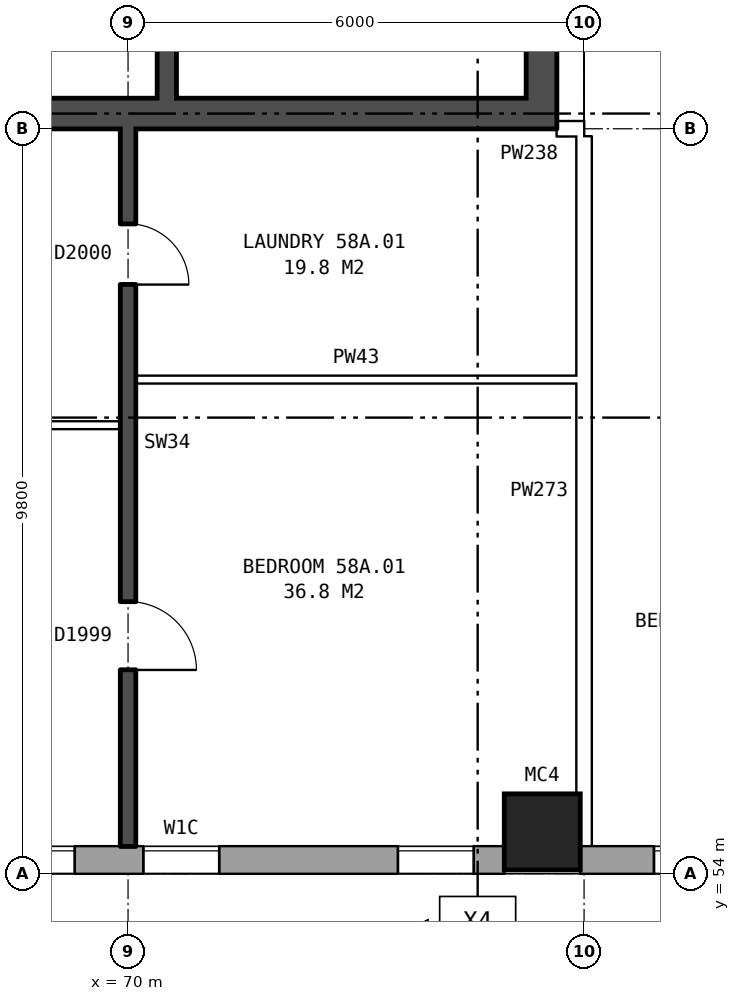
"""IFC4 building model, lengths in metres.
Left out: names, types, materials, properties, quantities, classifications, styles, units other than length and angle.
Written with IfcOpenShell. Run it as: python <this file> out.ifc"""

import sys

from ifc_helpers import new_model, si_unit, direction, frame, frame_2d, origin, origin_2d, place, context, subcontext, project, spatial, rectangle, hollow_rectangle, extrude, element, fill, save


model = new_model("IFC4")
c1 = context("Model", 3, precision=1e-05, world=origin(), true_north=direction((0.0, 1.0)))
c2 = subcontext(c1, "Body", "Model", "MODEL_VIEW")
j1 = project(units=[si_unit("LENGTHUNIT", "METRE"), si_unit("PLANEANGLEUNIT", "RADIAN")], contexts=[c1])
p1 = place(None, origin())
s1 = spatial("IfcSite", under=j1, at=p1, CompositionType="ELEMENT")
p2 = place(p1, origin())
s2 = spatial("IfcBuilding", under=s1, at=p2, CompositionType="ELEMENT")
p3 = place(p2, frame((0.0, 0.0, 205.9)))
s3 = spatial("IfcBuildingStorey", under=s2, at=p3, CompositionType="ELEMENT", Elevation=205.9)
p4 = place(p3, frame((75.45, 54.55, 0.0), z_axis=(0.0, 0.0, 1.0), x_axis=(1.0, 0.0, 0.0)))
e1 = element("IfcColumn", 1, at=p4, inside=s3, PredefinedType="COLUMN", context=c2, shape_type="SweptSolid", body=[
    extrude(hollow_rectangle(XDim=1.0, YDim=1.0, WallThickness=0.055, at=origin_2d()), origin(), (0.0, 0.0, 1.0), 3.1),
])
p5 = place(p3, frame((35.075, 54.18, 0.0), z_axis=(0.0, 0.0, 1.0), x_axis=(1.0, 0.0, 0.0)))
e2 = element("IfcWall", 2, at=p5, inside=s3, PredefinedType="STANDARD", context=c2, shape_type="SweptSolid", body=[
    extrude(rectangle(XDim=39.875, YDim=0.36, at=frame_2d((19.938, 0.0))), origin(), (0.0, 0.0, 1.0), 2.85),
])
p6 = place(p5, frame((2.625, 0.0, 0.8)))
e3 = element("IfcOpeningElement", 3, at=p6, cuts=e2, PredefinedType="OPENING", context=c2, shape_type="SweptSolid", body=[
    extrude(rectangle(XDim=1.6, YDim=1.8, at=frame_2d((0.8, 0.9))), frame((0.0, 0.19, 0.0), z_axis=(0.0, -1.0, 0.0), x_axis=(1.0, 0.0, 0.0)), (0.0, 0.0, 1.0), 0.38),
])
p7 = place(p5, frame((5.625, 0.0, 0.8)))
e4 = element("IfcOpeningElement", 4, at=p7, cuts=e2, PredefinedType="OPENING", context=c2, shape_type="SweptSolid", body=[
    extrude(rectangle(XDim=1.6, YDim=1.8, at=frame_2d((0.8, 0.9))), frame((0.0, 0.19, 0.0), z_axis=(0.0, -1.0, 0.0), x_axis=(1.0, 0.0, 0.0)), (0.0, 0.0, 1.0), 0.38),
])
p8 = place(p5, frame((8.625, 0.0, 0.8)))
e5 = element("IfcOpeningElement", 5, at=p8, cuts=e2, PredefinedType="OPENING", context=c2, shape_type="SweptSolid", body=[
    extrude(rectangle(XDim=1.6, YDim=1.8, at=frame_2d((0.8, 0.9))), frame((0.0, 0.19, 0.0), z_axis=(0.0, -1.0, 0.0), x_axis=(1.0, 0.0, 0.0)), (0.0, 0.0, 1.0), 0.38),
])
p9 = place(p5, frame((11.625, 0.0, 0.8)))
e6 = element("IfcOpeningElement", 6, at=p9, cuts=e2, PredefinedType="OPENING", context=c2, shape_type="SweptSolid", body=[
    extrude(rectangle(XDim=1.6, YDim=1.8, at=frame_2d((0.8, 0.9))), frame((0.0, 0.19, 0.0), z_axis=(0.0, -1.0, 0.0), x_axis=(1.0, 0.0, 0.0)), (0.0, 0.0, 1.0), 0.38),
])
p10 = place(p5, frame((14.625, 0.0, 0.8)))
e7 = element("IfcOpeningElement", 7, at=p10, cuts=e2, PredefinedType="OPENING", context=c2, shape_type="SweptSolid", body=[
    extrude(rectangle(XDim=1.6, YDim=1.8, at=frame_2d((0.8, 0.9))), frame((0.0, 0.19, 0.0), z_axis=(0.0, -1.0, 0.0), x_axis=(1.0, 0.0, 0.0)), (0.0, 0.0, 1.0), 0.38),
])
p11 = place(p5, frame((17.625, 0.0, 0.8)))
e8 = element("IfcOpeningElement", 8, at=p11, cuts=e2, PredefinedType="OPENING", context=c2, shape_type="SweptSolid", body=[
    extrude(rectangle(XDim=1.6, YDim=1.8, at=frame_2d((0.8, 0.9))), frame((0.0, 0.19, 0.0), z_axis=(0.0, -1.0, 0.0), x_axis=(1.0, 0.0, 0.0)), (0.0, 0.0, 1.0), 0.38),
])
p12 = place(p5, frame((20.625, 0.0, 0.8)))
e9 = element("IfcOpeningElement", 9, at=p12, cuts=e2, PredefinedType="OPENING", context=c2, shape_type="SweptSolid", body=[
    extrude(rectangle(XDim=1.6, YDim=1.8, at=frame_2d((0.8, 0.9))), frame((0.0, 0.19, 0.0), z_axis=(0.0, -1.0, 0.0), x_axis=(1.0, 0.0, 0.0)), (0.0, 0.0, 1.0), 0.38),
])
p13 = place(p5, frame((23.625, 0.0, 0.8)))
e10 = element("IfcOpeningElement", 10, at=p13, cuts=e2, PredefinedType="OPENING", context=c2, shape_type="SweptSolid", body=[
    extrude(rectangle(XDim=1.6, YDim=1.8, at=frame_2d((0.8, 0.9))), frame((0.0, 0.19, 0.0), z_axis=(0.0, -1.0, 0.0), x_axis=(1.0, 0.0, 0.0)), (0.0, 0.0, 1.0), 0.38),
])
p14 = place(p5, frame((26.625, 0.0, 0.8)))
e11 = element("IfcOpeningElement", 11, at=p14, cuts=e2, PredefinedType="OPENING", context=c2, shape_type="SweptSolid", body=[
    extrude(rectangle(XDim=1.6, YDim=1.8, at=frame_2d((0.8, 0.9))), frame((0.0, 0.19, 0.0), z_axis=(0.0, -1.0, 0.0), x_axis=(1.0, 0.0, 0.0)), (0.0, 0.0, 1.0), 0.38),
])
p15 = place(p5, frame((29.625, 0.0, 0.8)))
e12 = element("IfcOpeningElement", 12, at=p15, cuts=e2, PredefinedType="OPENING", context=c2, shape_type="SweptSolid", body=[
    extrude(rectangle(XDim=1.6, YDim=1.8, at=frame_2d((0.8, 0.9))), frame((0.0, 0.19, 0.0), z_axis=(0.0, -1.0, 0.0), x_axis=(1.0, 0.0, 0.0)), (0.0, 0.0, 1.0), 0.38),
])
p16 = place(p5, frame((32.625, 0.0, 0.8)))
e13 = element("IfcOpeningElement", 13, at=p16, cuts=e2, PredefinedType="OPENING", context=c2, shape_type="SweptSolid", body=[
    extrude(rectangle(XDim=1.6, YDim=1.8, at=frame_2d((0.8, 0.9))), frame((0.0, 0.19, 0.0), z_axis=(0.0, -1.0, 0.0), x_axis=(1.0, 0.0, 0.0)), (0.0, 0.0, 1.0), 0.38),
])
p17 = place(p5, frame((35.125, 0.0, 0.8)))
e14 = element("IfcOpeningElement", 14, at=p17, cuts=e2, PredefinedType="OPENING", context=c2, shape_type="SweptSolid", body=[
    extrude(rectangle(XDim=1.0, YDim=1.8, at=frame_2d((0.5, 0.9))), frame((0.0, 0.19, 0.0), z_axis=(0.0, -1.0, 0.0), x_axis=(1.0, 0.0, 0.0)), (0.0, 0.0, 1.0), 0.38),
])
p18 = place(p5, frame((38.475, 0.0, 0.8)))
e15 = element("IfcOpeningElement", 15, at=p18, cuts=e2, PredefinedType="OPENING", context=c2, shape_type="SweptSolid", body=[
    extrude(rectangle(XDim=1.0, YDim=1.8, at=frame_2d((0.5, 0.9))), frame((0.0, 0.19, 0.0), z_axis=(0.0, -1.0, 0.0), x_axis=(1.0, 0.0, 0.0)), (0.0, 0.0, 1.0), 0.38),
])
p19 = place(p3, frame((75.95, 54.18, 0.0), z_axis=(0.0, 0.0, 1.0), x_axis=(1.0, 0.0, 0.0)))
e16 = element("IfcWall", 16, at=p19, inside=s3, PredefinedType="STANDARD", context=c2, shape_type="SweptSolid", body=[
    extrude(rectangle(XDim=55.1, YDim=0.36, at=frame_2d((27.55, 0.0))), origin(), (0.0, 0.0, 1.0), 2.85),
])
p20 = place(p19, frame((0.969, 0.0, 0.8)))
e17 = element("IfcOpeningElement", 17, at=p20, cuts=e16, PredefinedType="OPENING", context=c2, shape_type="SweptSolid", body=[
    extrude(rectangle(XDim=1.6, YDim=1.8, at=frame_2d((0.8, 0.9))), frame((0.0, 0.19, 0.0), z_axis=(0.0, -1.0, 0.0), x_axis=(1.0, 0.0, 0.0)), (0.0, 0.0, 1.0), 0.38),
])
p21 = place(p19, frame((4.406, 0.0, 0.8)))
e18 = element("IfcOpeningElement", 18, at=p21, cuts=e16, PredefinedType="OPENING", context=c2, shape_type="SweptSolid", body=[
    extrude(rectangle(XDim=1.6, YDim=1.8, at=frame_2d((0.8, 0.9))), frame((0.0, 0.19, 0.0), z_axis=(0.0, -1.0, 0.0), x_axis=(1.0, 0.0, 0.0)), (0.0, 0.0, 1.0), 0.38),
])
p22 = place(p19, frame((7.844, 0.0, 0.8)))
e19 = element("IfcOpeningElement", 19, at=p22, cuts=e16, PredefinedType="OPENING", context=c2, shape_type="SweptSolid", body=[
    extrude(rectangle(XDim=1.6, YDim=1.8, at=frame_2d((0.8, 0.9))), frame((0.0, 0.19, 0.0), z_axis=(0.0, -1.0, 0.0), x_axis=(1.0, 0.0, 0.0)), (0.0, 0.0, 1.0), 0.38),
])
p23 = place(p19, frame((11.281, 0.0, 0.8)))
e20 = element("IfcOpeningElement", 20, at=p23, cuts=e16, PredefinedType="OPENING", context=c2, shape_type="SweptSolid", body=[
    extrude(rectangle(XDim=1.6, YDim=1.8, at=frame_2d((0.8, 0.9))), frame((0.0, 0.19, 0.0), z_axis=(0.0, -1.0, 0.0), x_axis=(1.0, 0.0, 0.0)), (0.0, 0.0, 1.0), 0.38),
])
p24 = place(p19, frame((14.719, 0.0, 0.8)))
e21 = element("IfcOpeningElement", 21, at=p24, cuts=e16, PredefinedType="OPENING", context=c2, shape_type="SweptSolid", body=[
    extrude(rectangle(XDim=1.6, YDim=1.8, at=frame_2d((0.8, 0.9))), frame((0.0, 0.19, 0.0), z_axis=(0.0, -1.0, 0.0), x_axis=(1.0, 0.0, 0.0)), (0.0, 0.0, 1.0), 0.38),
])
p25 = place(p19, frame((18.156, 0.0, 0.8)))
e22 = element("IfcOpeningElement", 22, at=p25, cuts=e16, PredefinedType="OPENING", context=c2, shape_type="SweptSolid", body=[
    extrude(rectangle(XDim=1.6, YDim=1.8, at=frame_2d((0.8, 0.9))), frame((0.0, 0.19, 0.0), z_axis=(0.0, -1.0, 0.0), x_axis=(1.0, 0.0, 0.0)), (0.0, 0.0, 1.0), 0.38),
])
p26 = place(p19, frame((21.594, 0.0, 0.8)))
e23 = element("IfcOpeningElement", 23, at=p26, cuts=e16, PredefinedType="OPENING", context=c2, shape_type="SweptSolid", body=[
    extrude(rectangle(XDim=1.6, YDim=1.8, at=frame_2d((0.8, 0.9))), frame((0.0, 0.19, 0.0), z_axis=(0.0, -1.0, 0.0), x_axis=(1.0, 0.0, 0.0)), (0.0, 0.0, 1.0), 0.38),
])
p27 = place(p19, frame((25.031, 0.0, 0.8)))
e24 = element("IfcOpeningElement", 24, at=p27, cuts=e16, PredefinedType="OPENING", context=c2, shape_type="SweptSolid", body=[
    extrude(rectangle(XDim=1.6, YDim=1.8, at=frame_2d((0.8, 0.9))), frame((0.0, 0.19, 0.0), z_axis=(0.0, -1.0, 0.0), x_axis=(1.0, 0.0, 0.0)), (0.0, 0.0, 1.0), 0.38),
])
p28 = place(p19, frame((28.469, 0.0, 0.8)))
e25 = element("IfcOpeningElement", 25, at=p28, cuts=e16, PredefinedType="OPENING", context=c2, shape_type="SweptSolid", body=[
    extrude(rectangle(XDim=1.6, YDim=1.8, at=frame_2d((0.8, 0.9))), frame((0.0, 0.19, 0.0), z_axis=(0.0, -1.0, 0.0), x_axis=(1.0, 0.0, 0.0)), (0.0, 0.0, 1.0), 0.38),
])
p29 = place(p19, frame((31.906, 0.0, 0.8)))
e26 = element("IfcOpeningElement", 26, at=p29, cuts=e16, PredefinedType="OPENING", context=c2, shape_type="SweptSolid", body=[
    extrude(rectangle(XDim=1.6, YDim=1.8, at=frame_2d((0.8, 0.9))), frame((0.0, 0.19, 0.0), z_axis=(0.0, -1.0, 0.0), x_axis=(1.0, 0.0, 0.0)), (0.0, 0.0, 1.0), 0.38),
])
p30 = place(p19, frame((35.344, 0.0, 0.8)))
e27 = element("IfcOpeningElement", 27, at=p30, cuts=e16, PredefinedType="OPENING", context=c2, shape_type="SweptSolid", body=[
    extrude(rectangle(XDim=1.6, YDim=1.8, at=frame_2d((0.8, 0.9))), frame((0.0, 0.19, 0.0), z_axis=(0.0, -1.0, 0.0), x_axis=(1.0, 0.0, 0.0)), (0.0, 0.0, 1.0), 0.38),
])
p31 = place(p19, frame((38.781, 0.0, 0.8)))
e28 = element("IfcOpeningElement", 28, at=p31, cuts=e16, PredefinedType="OPENING", context=c2, shape_type="SweptSolid", body=[
    extrude(rectangle(XDim=1.6, YDim=1.8, at=frame_2d((0.8, 0.9))), frame((0.0, 0.19, 0.0), z_axis=(0.0, -1.0, 0.0), x_axis=(1.0, 0.0, 0.0)), (0.0, 0.0, 1.0), 0.38),
])
p32 = place(p19, frame((42.219, 0.0, 0.8)))
e29 = element("IfcOpeningElement", 29, at=p32, cuts=e16, PredefinedType="OPENING", context=c2, shape_type="SweptSolid", body=[
    extrude(rectangle(XDim=1.6, YDim=1.8, at=frame_2d((0.8, 0.9))), frame((0.0, 0.19, 0.0), z_axis=(0.0, -1.0, 0.0), x_axis=(1.0, 0.0, 0.0)), (0.0, 0.0, 1.0), 0.38),
])
p33 = place(p19, frame((45.656, 0.0, 0.8)))
e30 = element("IfcOpeningElement", 30, at=p33, cuts=e16, PredefinedType="OPENING", context=c2, shape_type="SweptSolid", body=[
    extrude(rectangle(XDim=1.6, YDim=1.8, at=frame_2d((0.8, 0.9))), frame((0.0, 0.19, 0.0), z_axis=(0.0, -1.0, 0.0), x_axis=(1.0, 0.0, 0.0)), (0.0, 0.0, 1.0), 0.38),
])
p34 = place(p19, frame((49.094, 0.0, 0.8)))
e31 = element("IfcOpeningElement", 31, at=p34, cuts=e16, PredefinedType="OPENING", context=c2, shape_type="SweptSolid", body=[
    extrude(rectangle(XDim=1.6, YDim=1.8, at=frame_2d((0.8, 0.9))), frame((0.0, 0.19, 0.0), z_axis=(0.0, -1.0, 0.0), x_axis=(1.0, 0.0, 0.0)), (0.0, 0.0, 1.0), 0.38),
])
p35 = place(p19, frame((52.531, 0.0, 0.8)))
e32 = element("IfcOpeningElement", 32, at=p35, cuts=e16, PredefinedType="OPENING", context=c2, shape_type="SweptSolid", body=[
    extrude(rectangle(XDim=1.6, YDim=1.8, at=frame_2d((0.8, 0.9))), frame((0.0, 0.19, 0.0), z_axis=(0.0, -1.0, 0.0), x_axis=(1.0, 0.0, 0.0)), (0.0, 0.0, 1.0), 0.38),
])
p36 = place(p3, frame((75.44, 63.8, 0.0), z_axis=(0.0, 0.0, 1.0), x_axis=(0.0, 1.0, 0.0)))
e33 = element("IfcWall", 33, at=p36, inside=s3, PredefinedType="SHEAR", context=c2, shape_type="SweptSolid", body=[
    extrude(rectangle(XDim=12.4, YDim=0.4, at=frame_2d((6.2, 0.0))), origin(), (0.0, 0.0, 1.0), 2.85),
])
p37 = place(p36, frame((9.8, 0.0, 0.0)))
e34 = element("IfcOpeningElement", 34, at=p37, cuts=e33, PredefinedType="OPENING", context=c2, shape_type="SweptSolid", body=[
    extrude(rectangle(XDim=1.1, YDim=2.1, at=frame_2d((0.55, 1.05))), frame((0.0, 0.21, 0.0), z_axis=(0.0, -1.0, 0.0), x_axis=(1.0, 0.0, 0.0)), (0.0, 0.0, 1.0), 0.42),
])
p38 = place(p3, frame((67.04, 64.0, 0.0), z_axis=(0.0, 0.0, 1.0), x_axis=(1.0, 0.0, 0.0)))
e35 = element("IfcWall", 35, at=p38, inside=s3, PredefinedType="SHEAR", context=c2, shape_type="SweptSolid", body=[
    extrude(rectangle(XDim=8.2, YDim=0.4, at=frame_2d((4.1, 0.0))), origin(), (0.0, 0.0, 1.0), 2.85),
])
p39 = place(p3, frame((70.51, 64.2, 0.0), z_axis=(0.0, 0.0, 1.0), x_axis=(0.0, 1.0, 0.0)))
e36 = element("IfcWall", 36, at=p39, inside=s3, PredefinedType="SHEAR", context=c2, shape_type="SweptSolid", body=[
    extrude(rectangle(XDim=2.525, YDim=0.25, at=frame_2d((1.263, 0.0))), origin(), (0.0, 0.0, 1.0), 2.85),
])
p40 = place(p3, frame((64.1, 59.9, 0.0), z_axis=(0.0, 0.0, 1.0), x_axis=(1.0, 0.0, 0.0)))
e37 = element("IfcWall", 37, at=p40, inside=s3, PredefinedType="PARTITIONING", context=c2, shape_type="SweptSolid", body=[
    extrude(rectangle(XDim=5.8, YDim=0.1, at=frame_2d((2.9, 0.0))), origin(), (0.0, 0.0, 1.0), 2.85),
])
p41 = place(p40, frame((3.6, 0.0, 0.0)))
e38 = element("IfcOpeningElement", 38, at=p41, cuts=e37, PredefinedType="OPENING", context=c2, shape_type="SweptSolid", body=[
    extrude(rectangle(XDim=0.9, YDim=2.1, at=frame_2d((0.45, 1.05))), frame((0.0, 0.06, 0.0), z_axis=(0.0, -1.0, 0.0), x_axis=(1.0, 0.0, 0.0)), (0.0, 0.0, 1.0), 0.12),
])
p42 = place(p40, frame((0.7, 0.0, 0.0)))
e39 = element("IfcOpeningElement", 39, at=p42, cuts=e37, PredefinedType="OPENING", context=c2, shape_type="SweptSolid", body=[
    extrude(rectangle(XDim=0.9, YDim=2.1, at=frame_2d((0.45, 1.05))), frame((0.0, 0.06, 0.0), z_axis=(0.0, -1.0, 0.0), x_axis=(1.0, 0.0, 0.0)), (0.0, 0.0, 1.0), 0.12),
])
p43 = place(p3, frame((70.1, 60.5, 0.0), z_axis=(0.0, 0.0, 1.0), x_axis=(1.0, 0.0, 0.0)))
e40 = element("IfcWall", 40, at=p43, inside=s3, PredefinedType="PARTITIONING", context=c2, shape_type="SweptSolid", body=[
    extrude(rectangle(XDim=5.8, YDim=0.1, at=frame_2d((2.9, 0.0))), origin(), (0.0, 0.0, 1.0), 2.85),
])
p44 = place(p3, frame((75.64, 63.8, 0.0), z_axis=(0.0, 0.0, 1.0), x_axis=(1.0, 0.0, 0.0)))
e41 = element("IfcWall", 41, at=p44, inside=s3, PredefinedType="PARTITIONING", context=c2, shape_type="SweptSolid", body=[
    extrude(rectangle(XDim=0.36, YDim=0.2, at=frame_2d((0.18, 0.0))), origin(), (0.0, 0.0, 1.0), 2.85),
])
p45 = place(p3, frame((70.0, 54.36, 0.0), z_axis=(0.0, 0.0, 1.0), x_axis=(0.0, 1.0, 0.0)))
e42 = element("IfcWall", 42, at=p45, inside=s3, PredefinedType="SOLIDWALL", context=c2, shape_type="SweptSolid", body=[
    extrude(rectangle(XDim=9.44, YDim=0.2, at=frame_2d((4.72, 0.0))), origin(), (0.0, 0.0, 1.0), 2.85),
])
p46 = place(p45, frame((2.32, 0.0, 0.0)))
e43 = element("IfcOpeningElement", 43, at=p46, cuts=e42, PredefinedType="OPENING", context=c2, shape_type="SweptSolid", body=[
    extrude(rectangle(XDim=0.9, YDim=2.1, at=frame_2d((0.45, 1.05))), frame((0.0, 0.11, 0.0), z_axis=(0.0, -1.0, 0.0), x_axis=(1.0, 0.0, 0.0)), (0.0, 0.0, 1.0), 0.22),
])
p47 = place(p45, frame((7.39, 0.0, 0.0)))
e44 = element("IfcOpeningElement", 44, at=p47, cuts=e42, PredefinedType="OPENING", context=c2, shape_type="SweptSolid", body=[
    extrude(rectangle(XDim=0.8, YDim=2.1, at=frame_2d((0.4, 1.05))), frame((0.0, 0.11, 0.0), z_axis=(0.0, -1.0, 0.0), x_axis=(1.0, 0.0, 0.0)), (0.0, 0.0, 1.0), 0.22),
])
p48 = place(p3, frame((76.0, 54.36, 0.0), z_axis=(0.0, 0.0, 1.0), x_axis=(0.0, 1.0, 0.0)))
e45 = element("IfcWall", 45, at=p48, inside=s3, PredefinedType="PARTITIONING", context=c2, shape_type="SweptSolid", body=[
    extrude(rectangle(XDim=9.34, YDim=0.2, at=frame_2d((4.67, 0.0))), origin(), (0.0, 0.0, 1.0), 2.85),
])
p49 = place(p16, origin())
e46 = element("IfcWindow", 46, at=p49, inside=s3, PartitioningType="SINGLE_PANEL", PredefinedType="WINDOW", context=c2, shape_type="SweptSolid", body=[
    extrude(rectangle(XDim=1.6, YDim=1.8, at=frame_2d((0.8, 0.9))), frame((0.0, 0.15, 0.0), z_axis=(0.0, -1.0, 0.0), x_axis=(1.0, 0.0, 0.0)), (0.0, 0.0, 1.0), 0.06),
])
fill(e13, e46)
p50 = place(p17, origin())
e47 = element("IfcWindow", 47, at=p50, inside=s3, PartitioningType="SINGLE_PANEL", PredefinedType="WINDOW", context=c2, shape_type="SweptSolid", body=[
    extrude(rectangle(XDim=1.0, YDim=1.8, at=frame_2d((0.5, 0.9))), frame((0.0, 0.15, 0.0), z_axis=(0.0, -1.0, 0.0), x_axis=(1.0, 0.0, 0.0)), (0.0, 0.0, 1.0), 0.06),
])
fill(e14, e47)
p51 = place(p20, origin())
e48 = element("IfcWindow", 48, at=p51, inside=s3, PartitioningType="SINGLE_PANEL", PredefinedType="WINDOW", context=c2, shape_type="SweptSolid", body=[
    extrude(rectangle(XDim=1.6, YDim=1.8, at=frame_2d((0.8, 0.9))), frame((0.0, 0.15, 0.0), z_axis=(0.0, -1.0, 0.0), x_axis=(1.0, 0.0, 0.0)), (0.0, 0.0, 1.0), 0.06),
])
fill(e17, e48)
p52 = place(p46, frame((0.9, 0.0, 0.0), z_axis=(0.0, 0.0, 1.0), x_axis=(-1.0, 0.0, 0.0)))
e49 = element("IfcDoor", 49, at=p52, inside=s3, OperationType="SINGLE_SWING_RIGHT", PredefinedType="DOOR", context=c2, shape_type="SweptSolid", body=[
    extrude(rectangle(XDim=0.9, YDim=2.1, at=frame_2d((0.45, 1.05))), frame((0.0, 0.025, 0.0), z_axis=(0.0, -1.0, 0.0), x_axis=(1.0, 0.0, 0.0)), (0.0, 0.0, 1.0), 0.05),
])
fill(e43, e49)
p53 = place(p47, frame((0.8, 0.0, 0.0), z_axis=(0.0, 0.0, 1.0), x_axis=(-1.0, 0.0, 0.0)))
e50 = element("IfcDoor", 50, at=p53, inside=s3, OperationType="SINGLE_SWING_RIGHT", PredefinedType="DOOR", context=c2, shape_type="SweptSolid", body=[
    extrude(rectangle(XDim=0.8, YDim=2.1, at=frame_2d((0.4, 1.05))), frame((0.0, 0.025, 0.0), z_axis=(0.0, -1.0, 0.0), x_axis=(1.0, 0.0, 0.0)), (0.0, 0.0, 1.0), 0.05),
])
fill(e44, e50)
p54 = place(p18, origin())
e51 = element("IfcWindow", 51, at=p54, inside=s3, PartitioningType="SINGLE_PANEL", PredefinedType="WINDOW", context=c2, shape_type="SweptSolid", body=[
    extrude(rectangle(XDim=1.0, YDim=1.8, at=frame_2d((0.5, 0.9))), frame((0.0, 0.15, 0.0), z_axis=(0.0, -1.0, 0.0), x_axis=(1.0, 0.0, 0.0)), (0.0, 0.0, 1.0), 0.06),
])
fill(e15, e51)
save(model, sys.argv[1])
